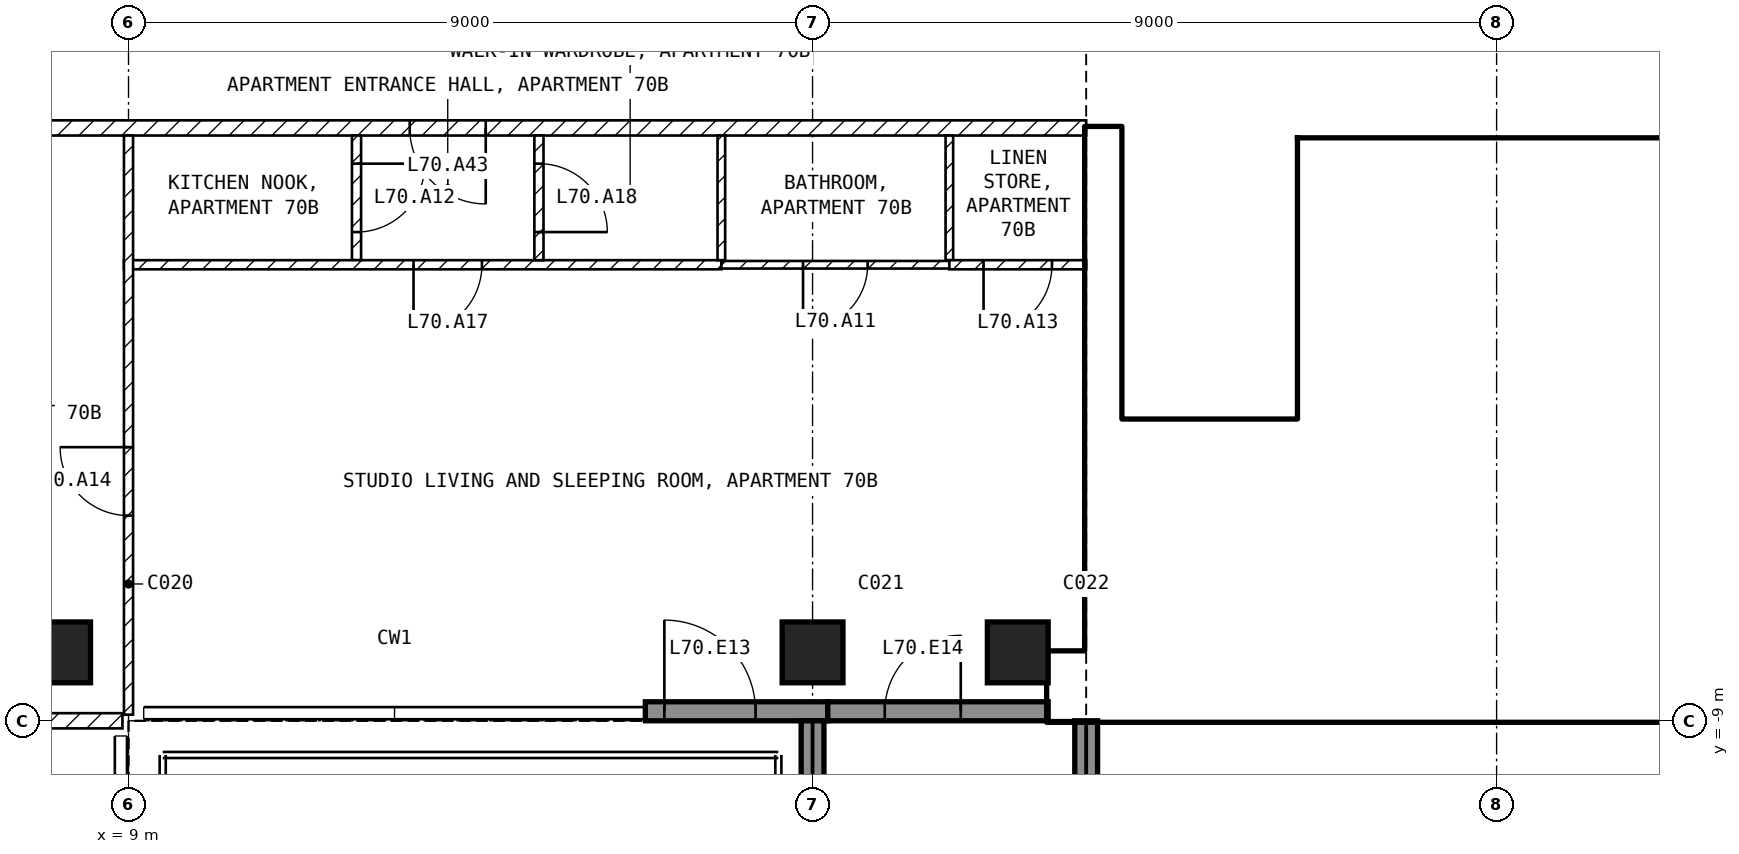
"""IFC4 building model, lengths in metres.
Left out: names, types, materials, properties, quantities, classifications, styles, units other than length and angle.
Written with IfcOpenShell. Run it as: python <this file> out.ifc"""

import sys

from ifc_helpers import new_model, si_unit, direction, frame, frame_2d, origin, origin_2d, place, context, subcontext, project, spatial, rectangle, extrude, element, fill, save


model = new_model("IFC4")
c1 = context("Model", 3, precision=1e-05, world=origin(), true_north=direction((0.0, 1.0)))
c2 = subcontext(c1, "Body", "Model", "MODEL_VIEW")
j1 = project(units=[si_unit("LENGTHUNIT", "METRE"), si_unit("PLANEANGLEUNIT", "RADIAN")], contexts=[c1])
p1 = place(None, origin())
s1 = spatial("IfcSite", under=j1, at=p1, CompositionType="ELEMENT")
p2 = place(p1, origin())
s2 = spatial("IfcBuilding", under=s1, at=p2, CompositionType="ELEMENT")
p3 = place(p2, frame((0.0, 0.0, 274.5)))
s3 = spatial("IfcBuildingStorey", under=s2, at=p3, CompositionType="ELEMENT", Elevation=274.5)
for number, where, z_axis, x_axis in (
    (1, (8.1, -8.1, -0.25), (0.0, 0.0, 1.0), (1.0, 0.0, 0.0)),
    (2, (18.0, -8.1, -0.25), (0.0, 0.0, 1.0), (1.0, 0.0, 0.0)),
    (3, (20.7, -8.1, -0.25), (0.0, 0.0, 1.0), (1.0, 0.0, 0.0)),
):
    element("IfcColumn", number, at=place(p3, frame(where, z_axis=z_axis, x_axis=x_axis)), inside=s3, PredefinedType="COLUMN", context=c2, shape_type="SweptSolid", body=[
        extrude(rectangle(XDim=0.8, YDim=0.8, at=origin_2d()), origin(), (0.0, 0.0, 1.0), 3.5),
    ])
p4 = place(p3, frame((15.8, -8.875, 0.0), z_axis=(0.0, 0.0, 1.0), x_axis=(1.0, 0.0, 0.0)))
e4 = element("IfcWall", 4, at=p4, inside=s3, PredefinedType="SOLIDWALL", context=c2, shape_type="SweptSolid", body=[
    extrude(rectangle(XDim=2.4, YDim=0.25, at=frame_2d((1.2, 0.0))), origin(), (0.0, 0.0, 1.0), 3.25),
])
p5 = place(p4, frame((0.25, 0.0, 0.0)))
e5 = element("IfcOpeningElement", 5, at=p5, cuts=e4, PredefinedType="OPENING", context=c2, shape_type="SweptSolid", body=[
    extrude(rectangle(XDim=1.2, YDim=2.4, at=frame_2d((0.6, 1.2))), frame((0.0, 0.135, 0.0), z_axis=(0.0, -1.0, 0.0), x_axis=(1.0, 0.0, 0.0)), (0.0, 0.0, 1.0), 0.27),
])
p6 = place(p3, frame((18.2, -8.875, 0.0), z_axis=(0.0, 0.0, 1.0), x_axis=(1.0, 0.0, 0.0)))
e6 = element("IfcWall", 6, at=p6, inside=s3, PredefinedType="SOLIDWALL", context=c2, shape_type="SweptSolid", body=[
    extrude(rectangle(XDim=2.9, YDim=0.25, at=frame_2d((1.45, 0.0))), origin(), (0.0, 0.0, 1.0), 3.25),
])
p7 = place(p6, frame((0.75, 0.0, 0.0)))
e7 = element("IfcOpeningElement", 7, at=p7, cuts=e6, PredefinedType="OPENING", context=c2, shape_type="SweptSolid", body=[
    extrude(rectangle(XDim=1.0, YDim=2.4, at=frame_2d((0.5, 1.2))), frame((0.0, 0.135, 0.0), z_axis=(0.0, -1.0, 0.0), x_axis=(1.0, 0.0, 0.0)), (0.0, 0.0, 1.0), 0.27),
])
p8 = place(p3, frame((18.0, -9.0, 0.0), z_axis=(0.0, 0.0, 1.0), x_axis=(0.0, -1.0, 0.0)))
e8 = element("IfcWall", 8, at=p8, inside=s3, PredefinedType="SOLIDWALL", context=c2, shape_type="SweptSolid", body=[
    extrude(rectangle(XDim=2.74, YDim=0.3, at=frame_2d((1.37, 0.0))), origin(), (0.0, 0.0, 1.0), 3.25),
])
p9 = place(p3, frame((21.6, -9.0, 0.0), z_axis=(0.0, 0.0, 1.0), x_axis=(0.0, -1.0, 0.0)))
e9 = element("IfcWall", 9, at=p9, inside=s3, PredefinedType="SOLIDWALL", context=c2, shape_type="SweptSolid", body=[
    extrude(rectangle(XDim=2.7, YDim=0.3, at=frame_2d((1.35, 0.0))), origin(), (0.0, 0.0, 1.0), 3.25),
])
p10 = place(p3, frame((21.1, -8.55, 0.0), z_axis=(0.0, 0.0, 1.0), x_axis=(1.0, 0.0, 0.0)))
e10 = element("IfcWall", 10, at=p10, inside=s3, PredefinedType="SHEAR", context=c2, shape_type="SweptSolid", body=[
    extrude(rectangle(XDim=9.1, YDim=0.9, at=frame_2d((4.55, 0.0))), origin(), (0.0, 0.0, 1.0), 3.25),
])
p11 = place(p3, frame((21.825, -8.1, 0.0), z_axis=(0.0, 0.0, 1.0), x_axis=(0.0, 1.0, 0.0)))
e11 = element("IfcWall", 11, at=p11, inside=s3, PredefinedType="SHEAR", context=c2, shape_type="SweptSolid", body=[
    extrude(rectangle(XDim=6.9, YDim=0.45, at=frame_2d((3.45, 0.0))), origin(), (0.0, 0.0, 1.0), 3.25),
])
p12 = place(p3, frame((24.5, -5.05, 0.0), z_axis=(0.0, 0.0, 1.0), x_axis=(0.0, 1.0, 0.0)))
e12 = element("IfcWall", 12, at=p12, inside=s3, PredefinedType="SOLIDWALL", context=c2, shape_type="SweptSolid", body=[
    extrude(rectangle(XDim=3.7, YDim=0.2, at=frame_2d((1.85, 0.0))), origin(), (0.0, 0.0, 1.0), 3.25),
])
p13 = place(p12, frame((0.1, 0.0, 0.0)))
e13 = element("IfcOpeningElement", 13, at=p13, cuts=e12, PredefinedType="OPENING", context=c2, shape_type="SweptSolid", body=[
    extrude(rectangle(XDim=0.8, YDim=2.1, at=frame_2d((0.4, 1.05))), frame((0.0, 0.11, 0.0), z_axis=(0.0, -1.0, 0.0), x_axis=(1.0, 0.0, 0.0)), (0.0, 0.0, 1.0), 0.22),
])
p14 = place(p3, frame((22.05, -5.15, 0.0), z_axis=(0.0, 0.0, 1.0), x_axis=(1.0, 0.0, 0.0)))
e14 = element("IfcWall", 14, at=p14, inside=s3, PredefinedType="SOLIDWALL", context=c2, shape_type="SweptSolid", body=[
    extrude(rectangle(XDim=6.3, YDim=0.2, at=frame_2d((3.15, 0.0))), origin(), (0.0, 0.0, 1.0), 3.25),
])
p15 = place(p14, frame((0.2, 0.0, 0.0)))
e15 = element("IfcOpeningElement", 15, at=p15, cuts=e14, PredefinedType="OPENING", context=c2, shape_type="SweptSolid", body=[
    extrude(rectangle(XDim=1.0, YDim=2.1, at=frame_2d((0.5, 1.05))), frame((0.0, 0.11, 0.0), z_axis=(0.0, -1.0, 0.0), x_axis=(1.0, 0.0, 0.0)), (0.0, 0.0, 1.0), 0.22),
])
p16 = place(p3, frame((28.25, -8.1, 0.0), z_axis=(0.0, 0.0, 1.0), x_axis=(0.0, 1.0, 0.0)))
e16 = element("IfcWall", 16, at=p16, inside=s3, PredefinedType="SOLIDWALL", context=c2, shape_type="SweptSolid", body=[
    extrude(rectangle(XDim=2.85, YDim=0.2, at=frame_2d((1.425, 0.0))), origin(), (0.0, 0.0, 1.0), 3.25),
])
p17 = place(p3, frame((24.6, -1.45, 0.0), z_axis=(0.0, 0.0, 1.0), x_axis=(1.0, 0.0, 0.0)))
e17 = element("IfcWall", 17, at=p17, inside=s3, PredefinedType="SOLIDWALL", context=c2, shape_type="SweptSolid", body=[
    extrude(rectangle(XDim=8.75, YDim=0.2, at=frame_2d((4.375, 0.0))), origin(), (0.0, 0.0, 1.0), 3.25),
])
p18 = place(p17, frame((0.4, 0.0, 0.0)))
e18 = element("IfcOpeningElement", 18, at=p18, cuts=e17, PredefinedType="OPENING", context=c2, shape_type="SweptSolid", body=[
    extrude(rectangle(XDim=1.0, YDim=2.1, at=frame_2d((0.5, 1.05))), frame((0.0, 0.11, 0.0), z_axis=(0.0, -1.0, 0.0), x_axis=(1.0, 0.0, 0.0)), (0.0, 0.0, 1.0), 0.22),
])
p19 = place(p17, frame((2.4, 0.0, 0.0)))
e19 = element("IfcOpeningElement", 19, at=p19, cuts=e17, PredefinedType="OPENING", context=c2, shape_type="SweptSolid", body=[
    extrude(rectangle(XDim=1.0, YDim=2.1, at=frame_2d((0.5, 1.05))), frame((0.0, 0.11, 0.0), z_axis=(0.0, -1.0, 0.0), x_axis=(1.0, 0.0, 0.0)), (0.0, 0.0, 1.0), 0.22),
])
p20 = place(p17, frame((4.4, 0.0, 0.0)))
e20 = element("IfcOpeningElement", 20, at=p20, cuts=e17, PredefinedType="OPENING", context=c2, shape_type="SweptSolid", body=[
    extrude(rectangle(XDim=1.0, YDim=2.1, at=frame_2d((0.5, 1.05))), frame((0.0, 0.11, 0.0), z_axis=(0.0, -1.0, 0.0), x_axis=(1.0, 0.0, 0.0)), (0.0, 0.0, 1.0), 0.22),
])
p21 = place(p17, frame((6.925, 0.0, 0.0)))
e21 = element("IfcOpeningElement", 21, at=p21, cuts=e17, PredefinedType="OPENING", context=c2, shape_type="SweptSolid", body=[
    extrude(rectangle(XDim=0.9, YDim=2.1, at=frame_2d((0.45, 1.05))), frame((0.0, 0.11, 0.0), z_axis=(0.0, -1.0, 0.0), x_axis=(1.0, 0.0, 0.0)), (0.0, 0.0, 1.0), 0.22),
])
p22 = place(p3, frame((24.6, -3.95, 0.0), z_axis=(0.0, 0.0, 1.0), x_axis=(1.0, 0.0, 0.0)))
e22 = element("IfcWall", 22, at=p22, inside=s3, PredefinedType="SOLIDWALL", context=c2, shape_type="SweptSolid", body=[
    extrude(rectangle(XDim=8.75, YDim=0.2, at=frame_2d((4.375, 0.0))), origin(), (0.0, 0.0, 1.0), 3.25),
])
for number, where, z_axis, x_axis in (
    (23, (26.5, -3.85, 0.0), (0.0, 0.0, 1.0), (0.0, 1.0, 0.0)),
    (24, (28.5, -3.85, 0.0), (0.0, 0.0, 1.0), (0.0, 1.0, 0.0)),
):
    element("IfcWall", number, at=place(p3, frame(where, z_axis=z_axis, x_axis=x_axis)), inside=s3, PredefinedType="SOLIDWALL", context=c2, shape_type="SweptSolid", body=[
        extrude(rectangle(XDim=2.3, YDim=0.2, at=frame_2d((1.15, 0.0))), origin(), (0.0, 0.0, 1.0), 3.25),
    ])
p23 = place(p3, frame((21.6, -1.2, 0.0), z_axis=(0.0, 0.0, 1.0), x_axis=(-1.0, 0.0, 0.0)))
e25 = element("IfcWall", 25, at=p23, inside=s3, PredefinedType="PARTITIONING", context=c2, shape_type="SweptSolid", body=[
    extrude(rectangle(XDim=17.2, YDim=0.2, at=frame_2d((8.6, 0.0))), origin(), (0.0, 0.0, 1.0), 3.25),
])
p24 = place(p23, frame((7.9, 0.0, 0.0)))
e26 = element("IfcOpeningElement", 26, at=p24, cuts=e25, PredefinedType="OPENING", context=c2, shape_type="SweptSolid", body=[
    extrude(rectangle(XDim=1.0, YDim=2.1, at=frame_2d((0.5, 1.05))), frame((0.0, 0.11, 0.0), z_axis=(0.0, -1.0, 0.0), x_axis=(1.0, 0.0, 0.0)), (0.0, 0.0, 1.0), 0.22),
])
p25 = place(p3, frame((8.92, -9.0, 0.0), z_axis=(0.0, 0.0, 1.0), x_axis=(-1.0, 0.0, 0.0)))
e27 = element("IfcWall", 27, at=p25, inside=s3, PredefinedType="PARTITIONING", context=c2, shape_type="SweptSolid", body=[
    extrude(rectangle(XDim=17.84, YDim=0.2, at=frame_2d((8.92, 0.0))), origin(), (0.0, 0.0, 1.0), 3.25),
])
p26 = place(p25, frame((8.42, 0.0, 0.0)))
e28 = element("IfcOpeningElement", 28, at=p26, cuts=e27, PredefinedType="OPENING", context=c2, shape_type="SweptSolid", body=[
    extrude(rectangle(XDim=1.0, YDim=2.1, at=frame_2d((0.5, 1.05))), frame((0.0, 0.11, 0.0), z_axis=(0.0, -1.0, 0.0), x_axis=(1.0, 0.0, 0.0)), (0.0, 0.0, 1.0), 0.22),
])
p27 = place(p3, frame((12.0, -1.3, 0.0), z_axis=(0.0, 0.0, 1.0), x_axis=(0.0, -1.0, 0.0)))
e29 = element("IfcWall", 29, at=p27, inside=s3, PredefinedType="PARTITIONING", context=c2, shape_type="SweptSolid", body=[
    extrude(rectangle(XDim=1.64, YDim=0.12, at=frame_2d((0.82, 0.0))), origin(), (0.0, 0.0, 1.0), 3.25),
])
p28 = place(p27, frame((0.37, 0.0, 0.0)))
e30 = element("IfcOpeningElement", 30, at=p28, cuts=e29, PredefinedType="OPENING", context=c2, shape_type="SweptSolid", body=[
    extrude(rectangle(XDim=0.9, YDim=2.1, at=frame_2d((0.45, 1.05))), frame((0.0, 0.07, 0.0), z_axis=(0.0, -1.0, 0.0), x_axis=(1.0, 0.0, 0.0)), (0.0, 0.0, 1.0), 0.14),
])
p29 = place(p3, frame((16.8, -3.0, 0.0), z_axis=(0.0, 0.0, 1.0), x_axis=(-1.0, 0.0, 0.0)))
e31 = element("IfcWall", 31, at=p29, inside=s3, PredefinedType="PARTITIONING", context=c2, shape_type="SweptSolid", body=[
    extrude(rectangle(XDim=7.86, YDim=0.12, at=frame_2d((3.93, 0.0))), origin(), (0.0, 0.0, 1.0), 3.25),
])
p30 = place(p29, frame((3.15, 0.0, 0.0)))
e32 = element("IfcOpeningElement", 32, at=p30, cuts=e31, PredefinedType="OPENING", context=c2, shape_type="SweptSolid", body=[
    extrude(rectangle(XDim=0.9, YDim=2.1, at=frame_2d((0.45, 1.05))), frame((0.0, 0.07, 0.0), z_axis=(0.0, -1.0, 0.0), x_axis=(1.0, 0.0, 0.0)), (0.0, 0.0, 1.0), 0.14),
])
p31 = place(p3, frame((9.0, -8.92, 0.0), z_axis=(0.0, 0.0, 1.0), x_axis=(0.0, 1.0, 0.0)))
e33 = element("IfcWall", 33, at=p31, inside=s3, PredefinedType="PARTITIONING", context=c2, shape_type="SweptSolid", body=[
    extrude(rectangle(XDim=7.62, YDim=0.12, at=frame_2d((3.81, 0.0))), origin(), (0.0, 0.0, 1.0), 3.25),
])
p32 = place(p31, frame((2.62, 0.0, 0.0)))
e34 = element("IfcOpeningElement", 34, at=p32, cuts=e33, PredefinedType="OPENING", context=c2, shape_type="SweptSolid", body=[
    extrude(rectangle(XDim=0.9, YDim=2.1, at=frame_2d((0.45, 1.05))), frame((0.0, 0.07, 0.0), z_axis=(0.0, -1.0, 0.0), x_axis=(1.0, 0.0, 0.0)), (0.0, 0.0, 1.0), 0.14),
])
p33 = place(p3, frame((14.4, -1.3, 0.0), z_axis=(0.0, 0.0, 1.0), x_axis=(0.0, -1.0, 0.0)))
e35 = element("IfcWall", 35, at=p33, inside=s3, PredefinedType="PARTITIONING", context=c2, shape_type="SweptSolid", body=[
    extrude(rectangle(XDim=1.64, YDim=0.12, at=frame_2d((0.82, 0.0))), origin(), (0.0, 0.0, 1.0), 3.25),
])
p34 = place(p33, frame((0.37, 0.0, 0.0)))
e36 = element("IfcOpeningElement", 36, at=p34, cuts=e35, PredefinedType="OPENING", context=c2, shape_type="SweptSolid", body=[
    extrude(rectangle(XDim=0.9, YDim=2.1, at=frame_2d((0.45, 1.05))), frame((0.0, 0.07, 0.0), z_axis=(0.0, -1.0, 0.0), x_axis=(1.0, 0.0, 0.0)), (0.0, 0.0, 1.0), 0.14),
])
for number, where, z_axis, x_axis in (
    (37, (16.8, -1.3, 0.0), (0.0, 0.0, 1.0), (0.0, -1.0, 0.0)),
    (38, (19.8, -1.3, 0.0), (0.0, 0.0, 1.0), (0.0, -1.0, 0.0)),
):
    element("IfcWall", number, at=place(p3, frame(where, z_axis=z_axis, x_axis=x_axis)), inside=s3, PredefinedType="PARTITIONING", context=c2, shape_type="SweptSolid", body=[
        extrude(rectangle(XDim=1.64, YDim=0.1, at=frame_2d((0.82, 0.0))), origin(), (0.0, 0.0, 1.0), 3.25),
    ])
p35 = place(p3, frame((19.8, -3.0, 0.0), z_axis=(0.0, 0.0, 1.0), x_axis=(-1.0, 0.0, 0.0)))
e39 = element("IfcWall", 39, at=p35, inside=s3, PredefinedType="PARTITIONING", context=c2, shape_type="SweptSolid", body=[
    extrude(rectangle(XDim=3.0, YDim=0.1, at=frame_2d((1.5, 0.0))), origin(), (0.0, 0.0, 1.0), 3.25),
])
p36 = place(p35, frame((1.075, 0.0, 0.0)))
e40 = element("IfcOpeningElement", 40, at=p36, cuts=e39, PredefinedType="OPENING", context=c2, shape_type="SweptSolid", body=[
    extrude(rectangle(XDim=0.85, YDim=2.1, at=frame_2d((0.425, 1.05))), frame((0.0, 0.06, 0.0), z_axis=(0.0, -1.0, 0.0), x_axis=(1.0, 0.0, 0.0)), (0.0, 0.0, 1.0), 0.12),
])
p37 = place(p3, frame((21.6, -3.0, 0.0), z_axis=(0.0, 0.0, 1.0), x_axis=(-1.0, 0.0, 0.0)))
e41 = element("IfcWall", 41, at=p37, inside=s3, PredefinedType="PARTITIONING", context=c2, shape_type="SweptSolid", body=[
    extrude(rectangle(XDim=1.8, YDim=0.12, at=frame_2d((0.9, 0.0))), origin(), (0.0, 0.0, 1.0), 3.25),
])
p38 = place(p37, frame((0.45, 0.0, 0.0)))
e42 = element("IfcOpeningElement", 42, at=p38, cuts=e41, PredefinedType="OPENING", context=c2, shape_type="SweptSolid", body=[
    extrude(rectangle(XDim=0.9, YDim=2.1, at=frame_2d((0.45, 1.05))), frame((0.0, 0.07, 0.0), z_axis=(0.0, -1.0, 0.0), x_axis=(1.0, 0.0, 0.0)), (0.0, 0.0, 1.0), 0.14),
])
p39 = place(p5, origin())
e43 = element("IfcDoor", 43, at=p39, inside=s3, OperationType="SINGLE_SWING_LEFT", PredefinedType="DOOR", context=c2, shape_type="SweptSolid", body=[
    extrude(rectangle(XDim=1.2, YDim=2.4, at=frame_2d((0.6, 1.2))), frame((0.0, 0.025, 0.0), z_axis=(0.0, -1.0, 0.0), x_axis=(1.0, 0.0, 0.0)), (0.0, 0.0, 1.0), 0.05),
])
fill(e5, e43)
p40 = place(p7, origin())
e44 = element("IfcDoor", 44, at=p40, inside=s3, OperationType="SINGLE_SWING_RIGHT", PredefinedType="DOOR", context=c2, shape_type="SweptSolid", body=[
    extrude(rectangle(XDim=1.0, YDim=2.4, at=frame_2d((0.5, 1.2))), frame((0.0, 0.025, 0.0), z_axis=(0.0, -1.0, 0.0), x_axis=(1.0, 0.0, 0.0)), (0.0, 0.0, 1.0), 0.05),
])
fill(e7, e44)
p41 = place(p18, origin())
e45 = element("IfcDoor", 45, at=p41, inside=s3, OperationType="DOUBLE_DOOR_SLIDING", PredefinedType="DOOR", context=c2, shape_type="SweptSolid", body=[
    extrude(rectangle(XDim=1.0, YDim=2.1, at=frame_2d((0.5, 1.05))), frame((0.0, 0.025, 0.0), z_axis=(0.0, -1.0, 0.0), x_axis=(1.0, 0.0, 0.0)), (0.0, 0.0, 1.0), 0.05),
])
fill(e18, e45)
p42 = place(p19, origin())
e46 = element("IfcDoor", 46, at=p42, inside=s3, OperationType="DOUBLE_DOOR_SLIDING", PredefinedType="DOOR", context=c2, shape_type="SweptSolid", body=[
    extrude(rectangle(XDim=1.0, YDim=2.1, at=frame_2d((0.5, 1.05))), frame((0.0, 0.025, 0.0), z_axis=(0.0, -1.0, 0.0), x_axis=(1.0, 0.0, 0.0)), (0.0, 0.0, 1.0), 0.05),
])
fill(e19, e46)
p43 = place(p20, origin())
e47 = element("IfcDoor", 47, at=p43, inside=s3, OperationType="DOUBLE_DOOR_SLIDING", PredefinedType="DOOR", context=c2, shape_type="SweptSolid", body=[
    extrude(rectangle(XDim=1.0, YDim=2.1, at=frame_2d((0.5, 1.05))), frame((0.0, 0.025, 0.0), z_axis=(0.0, -1.0, 0.0), x_axis=(1.0, 0.0, 0.0)), (0.0, 0.0, 1.0), 0.05),
])
fill(e20, e47)
p44 = place(p15, origin())
e48 = element("IfcDoor", 48, at=p44, inside=s3, OperationType="SINGLE_SWING_LEFT", PredefinedType="DOOR", context=c2, shape_type="SweptSolid", body=[
    extrude(rectangle(XDim=1.0, YDim=2.1, at=frame_2d((0.5, 1.05))), frame((0.0, 0.025, 0.0), z_axis=(0.0, -1.0, 0.0), x_axis=(1.0, 0.0, 0.0)), (0.0, 0.0, 1.0), 0.05),
])
fill(e15, e48)
p45 = place(p13, origin())
e49 = element("IfcDoor", 49, at=p45, inside=s3, OperationType="SINGLE_SWING_LEFT", PredefinedType="DOOR", context=c2, shape_type="SweptSolid", body=[
    extrude(rectangle(XDim=0.8, YDim=2.1, at=frame_2d((0.4, 1.05))), frame((0.0, 0.025, 0.0), z_axis=(0.0, -1.0, 0.0), x_axis=(1.0, 0.0, 0.0)), (0.0, 0.0, 1.0), 0.05),
])
fill(e13, e49)
p46 = place(p36, origin())
e50 = element("IfcDoor", 50, at=p46, inside=s3, OperationType="SINGLE_SWING_RIGHT", PredefinedType="DOOR", context=c2, shape_type="SweptSolid", body=[
    extrude(rectangle(XDim=0.85, YDim=2.1, at=frame_2d((0.425, 1.05))), frame((0.0, 0.025, 0.0), z_axis=(0.0, -1.0, 0.0), x_axis=(1.0, 0.0, 0.0)), (0.0, 0.0, 1.0), 0.05),
])
fill(e40, e50)
p47 = place(p28, origin())
e51 = element("IfcDoor", 51, at=p47, inside=s3, OperationType="SINGLE_SWING_LEFT", PredefinedType="DOOR", context=c2, shape_type="SweptSolid", body=[
    extrude(rectangle(XDim=0.9, YDim=2.1, at=frame_2d((0.45, 1.05))), frame((0.0, 0.025, 0.0), z_axis=(0.0, -1.0, 0.0), x_axis=(1.0, 0.0, 0.0)), (0.0, 0.0, 1.0), 0.05),
])
fill(e30, e51)
p48 = place(p38, origin())
e52 = element("IfcDoor", 52, at=p48, inside=s3, OperationType="SINGLE_SWING_RIGHT", PredefinedType="DOOR", context=c2, shape_type="SweptSolid", body=[
    extrude(rectangle(XDim=0.9, YDim=2.1, at=frame_2d((0.45, 1.05))), frame((0.0, 0.025, 0.0), z_axis=(0.0, -1.0, 0.0), x_axis=(1.0, 0.0, 0.0)), (0.0, 0.0, 1.0), 0.05),
])
fill(e42, e52)
p49 = place(p32, origin())
e53 = element("IfcDoor", 53, at=p49, inside=s3, OperationType="SINGLE_SWING_RIGHT", PredefinedType="DOOR", context=c2, shape_type="SweptSolid", body=[
    extrude(rectangle(XDim=0.9, YDim=2.1, at=frame_2d((0.45, 1.05))), frame((0.0, 0.025, 0.0), z_axis=(0.0, -1.0, 0.0), x_axis=(1.0, 0.0, 0.0)), (0.0, 0.0, 1.0), 0.05),
])
fill(e34, e53)
p50 = place(p30, origin())
e54 = element("IfcDoor", 54, at=p50, inside=s3, OperationType="SINGLE_SWING_RIGHT", PredefinedType="DOOR", context=c2, shape_type="SweptSolid", body=[
    extrude(rectangle(XDim=0.9, YDim=2.1, at=frame_2d((0.45, 1.05))), frame((0.0, 0.025, 0.0), z_axis=(0.0, -1.0, 0.0), x_axis=(1.0, 0.0, 0.0)), (0.0, 0.0, 1.0), 0.05),
])
fill(e32, e54)
p51 = place(p34, origin())
e55 = element("IfcDoor", 55, at=p51, inside=s3, OperationType="SINGLE_SWING_RIGHT", PredefinedType="DOOR", context=c2, shape_type="SweptSolid", body=[
    extrude(rectangle(XDim=0.9, YDim=2.1, at=frame_2d((0.45, 1.05))), frame((0.0, 0.025, 0.0), z_axis=(0.0, -1.0, 0.0), x_axis=(1.0, 0.0, 0.0)), (0.0, 0.0, 1.0), 0.05),
])
fill(e36, e55)
p52 = place(p24, origin())
e56 = element("IfcDoor", 56, at=p52, inside=s3, OperationType="SINGLE_SWING_LEFT", PredefinedType="DOOR", context=c2, shape_type="SweptSolid", body=[
    extrude(rectangle(XDim=1.0, YDim=2.1, at=frame_2d((0.5, 1.05))), frame((0.0, 0.025, 0.0), z_axis=(0.0, -1.0, 0.0), x_axis=(1.0, 0.0, 0.0)), (0.0, 0.0, 1.0), 0.05),
])
fill(e26, e56)
save(model, sys.argv[1])
